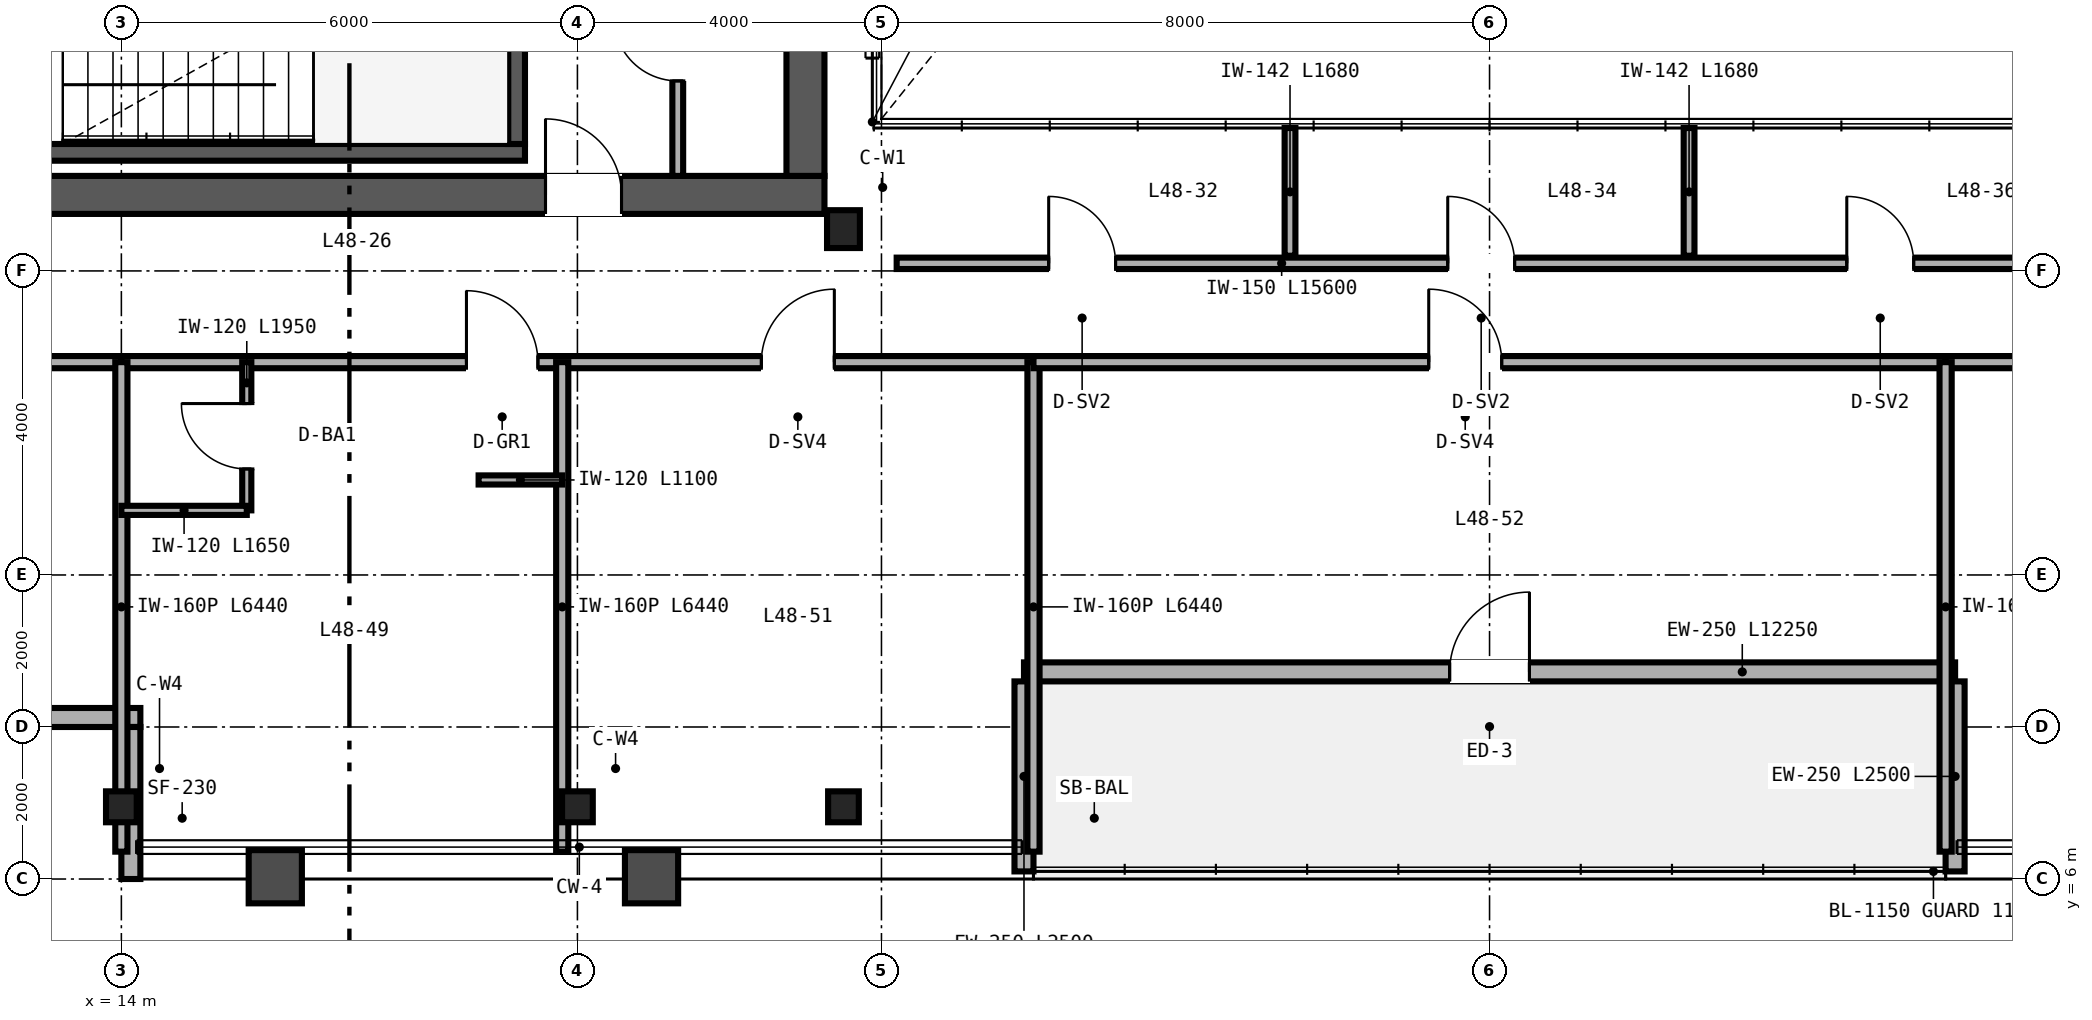
"""IFC4 building model, lengths in metres.
Left out: names, types, materials, properties, quantities, classifications, styles, units other than length and angle.
Written with IfcOpenShell. Run it as: python <this file> out.ifc"""

import sys

from ifc_helpers import new_model, si_unit, direction, frame, frame_2d, origin, origin_2d, place, context, subcontext, project, spatial, rectangle, i_section, extrude, source, transform, mapped, element, fill, save


model = new_model("IFC4")
c1 = context("Model", 3, precision=1e-05, world=origin(), true_north=direction((0.0, 1.0)))
c2 = subcontext(c1, "Body", "Model", "MODEL_VIEW")
j1 = project(units=[si_unit("LENGTHUNIT", "METRE"), si_unit("PLANEANGLEUNIT", "RADIAN")], contexts=[c1])
p1 = place(None, origin())
s1 = spatial("IfcSite", under=j1, at=p1, CompositionType="ELEMENT")
p2 = place(p1, origin())
s2 = spatial("IfcBuilding", under=s1, at=p2, CompositionType="ELEMENT")
p3 = place(p2, frame((0.0, 0.0, 192.0)))
s3 = spatial("IfcBuildingStorey", under=s2, at=p3, CompositionType="ELEMENT", Elevation=192.0)
p4 = place(p3, frame((10.75, 15.0, 0.0), z_axis=(0.0, 0.0, 1.0), x_axis=(1.0, 0.0, 0.0)))
e1 = element("IfcWall", 1, at=p4, inside=s3, PredefinedType="SHEAR", context=c2, shape_type="SweptSolid", body=[
    extrude(rectangle(XDim=12.5, YDim=0.5, at=frame_2d((6.25, 0.0))), origin(), (0.0, 0.0, 1.0), 3.37),
])
p5 = place(p4, frame((8.83, 0.0, 0.0)))
e2 = element("IfcOpeningElement", 2, at=p5, cuts=e1, PredefinedType="OPENING", context=c2, shape_type="SweptSolid", body=[
    extrude(rectangle(XDim=1.0, YDim=2.15, at=frame_2d((0.5, 1.075))), frame((0.0, 0.26, 0.0), z_axis=(0.0, -1.0, 0.0), x_axis=(1.0, 0.0, 0.0)), (0.0, 0.0, 1.0), 0.52),
])
p6 = place(p3, frame((23.0, 15.25, 0.0), z_axis=(0.0, 0.0, 1.0), x_axis=(0.0, 1.0, 0.0)))
e3 = element("IfcWall", 3, at=p6, inside=s3, PredefinedType="SHEAR", context=c2, shape_type="SweptSolid", body=[
    extrude(rectangle(XDim=21.5, YDim=0.5, at=frame_2d((10.75, 0.0))), origin(), (0.0, 0.0, 1.0), 3.37),
])
p7 = place(p3, frame((11.25, 15.56, 0.0), z_axis=(0.0, 0.0, 1.0), x_axis=(1.0, 0.0, 0.0)))
e4 = element("IfcWall", 4, at=p7, inside=s3, PredefinedType="SHEAR", context=c2, shape_type="SweptSolid", body=[
    extrude(rectangle(XDim=8.06, YDim=0.22, at=frame_2d((4.03, 0.0))), origin(), (0.0, 0.0, 1.0), 3.4),
])
p8 = place(p3, frame((19.2, 15.67, 0.0), z_axis=(0.0, 0.0, 1.0), x_axis=(0.0, 1.0, 0.0)))
e5 = element("IfcWall", 5, at=p8, inside=s3, PredefinedType="SHEAR", context=c2, shape_type="SweptSolid", body=[
    extrude(rectangle(XDim=3.28, YDim=0.22, at=frame_2d((1.64, 0.0))), origin(), (0.0, 0.0, 1.0), 3.4),
])
m1 = source(origin(), c2, "Body", "SweptSolid", [
    extrude(i_section(OverallWidth=0.432, OverallDepth=0.498, WebThickness=0.056, FlangeThickness=0.089, FilletRadius=0.025, at=origin_2d()), origin(), (0.0, 0.0, 1.0), 3.37),
])
p9 = place(p3, frame((23.5, 14.55, 0.0), z_axis=(0.0, 0.0, 1.0), x_axis=(1.0, 0.0, 0.0)))
e6 = element("IfcColumn", 6, at=p9, inside=s3, PredefinedType="COLUMN", context=c2, shape_type="MappedRepresentation", body=[
    mapped(m1, transform((0.0, 0.0, 0.0), scale=1.0)),
])
m2 = source(origin(), c2, "Body", "SweptSolid", [
    extrude(i_section(OverallWidth=0.404, OverallDepth=0.407, WebThickness=0.027, FlangeThickness=0.044, FilletRadius=0.025, at=origin_2d()), origin(), (0.0, 0.0, 1.0), 3.37),
])
for number, where, z_axis, x_axis in (
    (7, (14.0, 6.95, 0.0), (0.0, 0.0, 1.0), (1.0, 0.0, 0.0)),
    (8, (20.0, 6.95, 0.0), (0.0, 0.0, 1.0), (1.0, 0.0, 0.0)),
    (9, (23.5, 6.95, 0.0), (0.0, 0.0, 1.0), (1.0, 0.0, 0.0)),
):
    element("IfcColumn", number, at=place(p3, frame(where, z_axis=z_axis, x_axis=x_axis)), inside=s3, PredefinedType="COLUMN", context=c2, shape_type="MappedRepresentation", body=[
        mapped(m2, transform((0.0, 0.0, 0.0), scale=1.0)),
    ])
p10 = place(p3, frame((12.25, 8.125, 0.0), z_axis=(0.0, 0.0, 1.0), x_axis=(1.0, 0.0, 0.0)))
e10 = element("IfcWall", 10, at=p10, inside=s3, PredefinedType="SOLIDWALL", context=c2, shape_type="SweptSolid", body=[
    extrude(rectangle(XDim=2.0, YDim=0.25, at=frame_2d((1.0, 0.0))), origin(), (0.0, 0.0, 1.0), 3.37),
])
p11 = place(p3, frame((14.125, 8.0, 0.0), z_axis=(0.0, 0.0, 1.0), x_axis=(0.0, -1.0, 0.0)))
e11 = element("IfcWall", 11, at=p11, inside=s3, PredefinedType="SOLIDWALL", context=c2, shape_type="SweptSolid", body=[
    extrude(rectangle(XDim=2.0, YDim=0.25, at=frame_2d((1.0, 0.0))), origin(), (0.0, 0.0, 1.0), 2.677),
])
p12 = place(p3, frame((25.875, 8.725, 0.0), z_axis=(0.0, 0.0, 1.0), x_axis=(1.0, 0.0, 0.0)))
e12 = element("IfcWall", 12, at=p12, inside=s3, PredefinedType="SOLIDWALL", context=c2, shape_type="SweptSolid", body=[
    extrude(rectangle(XDim=12.25, YDim=0.25, at=frame_2d((6.125, 0.0))), origin(), (0.0, 0.0, 1.0), 3.37),
])
p13 = place(p12, frame((5.6, 0.0, 0.0)))
e13 = element("IfcOpeningElement", 13, at=p13, cuts=e12, PredefinedType="OPENING", context=c2, shape_type="SweptSolid", body=[
    extrude(rectangle(XDim=1.05, YDim=2.15, at=frame_2d((0.525, 1.075))), frame((0.0, 0.135, 0.0), z_axis=(0.0, -1.0, 0.0), x_axis=(1.0, 0.0, 0.0)), (0.0, 0.0, 1.0), 0.27),
])
for number, where, z_axis, x_axis in (
    (14, (25.875, 6.1, 0.0), (0.0, 0.0, 1.0), (0.0, 1.0, 0.0)),
    (15, (38.125, 6.1, 0.0), (0.0, 0.0, 1.0), (0.0, 1.0, 0.0)),
):
    element("IfcWall", number, at=place(p3, frame(where, z_axis=z_axis, x_axis=x_axis)), inside=s3, PredefinedType="SOLIDWALL", context=c2, shape_type="SweptSolid", body=[
        extrude(rectangle(XDim=2.5, YDim=0.25, at=frame_2d((1.25, 0.0))), origin(), (0.0, 0.0, 1.0), 2.443),
    ])
p14 = place(p3, frame((21.32, 15.25, 0.0), z_axis=(0.0, 0.0, 1.0), x_axis=(0.0, 1.0, 0.0)))
e16 = element("IfcWall", 16, at=p14, inside=s3, PredefinedType="PARTITIONING", context=c2, shape_type="SweptSolid", body=[
    extrude(rectangle(XDim=3.59, YDim=0.142, at=frame_2d((1.795, 0.0))), origin(), (0.0, 0.0, 1.0), 3.37),
])
p15 = place(p14, frame((1.25, 0.0, 0.0)))
e17 = element("IfcOpeningElement", 17, at=p15, cuts=e16, PredefinedType="OPENING", context=c2, shape_type="SweptSolid", body=[
    extrude(rectangle(XDim=0.84, YDim=2.1, at=frame_2d((0.42, 1.05))), frame((0.0, 0.081, 0.0), z_axis=(0.0, -1.0, 0.0), x_axis=(1.0, 0.0, 0.0)), (0.0, 0.0, 1.0), 0.162),
])
p16 = place(p3, frame((24.2, 14.1, 0.0), z_axis=(0.0, 0.0, 1.0), x_axis=(1.0, 0.0, 0.0)))
e18 = element("IfcWall", 18, at=p16, inside=s3, PredefinedType="PARTITIONING", context=c2, shape_type="SweptSolid", body=[
    extrude(rectangle(XDim=15.6, YDim=0.15, at=frame_2d((7.8, 0.0))), origin(), (0.0, 0.0, 1.0), 3.37),
])
p17 = place(p16, frame((2.0, 0.0, 0.0)))
e19 = element("IfcOpeningElement", 19, at=p17, cuts=e18, PredefinedType="OPENING", context=c2, shape_type="SweptSolid", body=[
    extrude(rectangle(XDim=0.88, YDim=2.15, at=frame_2d((0.44, 1.075))), frame((0.0, 0.085, 0.0), z_axis=(0.0, -1.0, 0.0), x_axis=(1.0, 0.0, 0.0)), (0.0, 0.0, 1.0), 0.17),
])
p18 = place(p16, frame((7.25, 0.0, 0.0)))
e20 = element("IfcOpeningElement", 20, at=p18, cuts=e18, PredefinedType="OPENING", context=c2, shape_type="SweptSolid", body=[
    extrude(rectangle(XDim=0.88, YDim=2.15, at=frame_2d((0.44, 1.075))), frame((0.0, 0.085, 0.0), z_axis=(0.0, -1.0, 0.0), x_axis=(1.0, 0.0, 0.0)), (0.0, 0.0, 1.0), 0.17),
])
p19 = place(p16, frame((12.5, 0.0, 0.0)))
e21 = element("IfcOpeningElement", 21, at=p19, cuts=e18, PredefinedType="OPENING", context=c2, shape_type="SweptSolid", body=[
    extrude(rectangle(XDim=0.88, YDim=2.15, at=frame_2d((0.44, 1.075))), frame((0.0, 0.085, 0.0), z_axis=(0.0, -1.0, 0.0), x_axis=(1.0, 0.0, 0.0)), (0.0, 0.0, 1.0), 0.17),
])
for number, where, z_axis, x_axis in (
    (22, (29.375, 14.2, 0.0), (0.0, 0.0, 1.0), (0.0, 1.0, 0.0)),
    (23, (34.625, 14.2, 0.0), (0.0, 0.0, 1.0), (0.0, 1.0, 0.0)),
):
    element("IfcWall", number, at=place(p3, frame(where, z_axis=z_axis, x_axis=x_axis)), inside=s3, PredefinedType="PARTITIONING", context=c2, shape_type="SweptSolid", body=[
        extrude(rectangle(XDim=1.68, YDim=0.142, at=frame_2d((0.84, 0.0))), origin(), (0.0, 0.0, 1.0), 3.37),
    ])
p20 = place(p3, frame((10.0, 12.8, 0.0), z_axis=(0.0, 0.0, 1.0), x_axis=(1.0, 0.0, 0.0)))
e24 = element("IfcWall", 24, at=p20, inside=s3, PredefinedType="PARTITIONING", context=c2, shape_type="SweptSolid", body=[
    extrude(rectangle(XDim=4.0, YDim=0.16, at=frame_2d((2.0, 0.0))), origin(), (0.0, 0.0, 1.0), 3.37),
])
p21 = place(p20, frame((1.52, 0.0, 0.0)))
e25 = element("IfcOpeningElement", 25, at=p21, cuts=e24, PredefinedType="OPENING", context=c2, shape_type="SweptSolid", body=[
    extrude(rectangle(XDim=0.96, YDim=2.15, at=frame_2d((0.48, 1.075))), frame((0.0, 0.09, 0.0), z_axis=(0.0, -1.0, 0.0), x_axis=(1.0, 0.0, 0.0)), (0.0, 0.0, 1.0), 0.18),
])
p22 = place(p3, frame((14.0, 12.8, 0.0), z_axis=(0.0, 0.0, 1.0), x_axis=(1.0, 0.0, 0.0)))
e26 = element("IfcWall", 26, at=p22, inside=s3, PredefinedType="PARTITIONING", context=c2, shape_type="SweptSolid", body=[
    extrude(rectangle(XDim=12.0, YDim=0.16, at=frame_2d((6.0, 0.0))), origin(), (0.0, 0.0, 1.0), 2.913),
])
p23 = place(p22, frame((4.54, 0.0, 0.0)))
e27 = element("IfcOpeningElement", 27, at=p23, cuts=e26, PredefinedType="OPENING", context=c2, shape_type="SweptSolid", body=[
    extrude(rectangle(XDim=0.94, YDim=2.15, at=frame_2d((0.47, 1.075))), frame((0.0, 0.09, 0.0), z_axis=(0.0, -1.0, 0.0), x_axis=(1.0, 0.0, 0.0)), (0.0, 0.0, 1.0), 0.18),
])
p24 = place(p22, frame((8.42, 0.0, 0.0)))
e28 = element("IfcOpeningElement", 28, at=p24, cuts=e26, PredefinedType="OPENING", context=c2, shape_type="SweptSolid", body=[
    extrude(rectangle(XDim=0.96, YDim=2.15, at=frame_2d((0.48, 1.075))), frame((0.0, 0.09, 0.0), z_axis=(0.0, -1.0, 0.0), x_axis=(1.0, 0.0, 0.0)), (0.0, 0.0, 1.0), 0.18),
])
p25 = place(p3, frame((14.0, 6.36, 0.0), z_axis=(0.0, 0.0, 1.0), x_axis=(0.0, 1.0, 0.0)))
e29 = element("IfcWall", 29, at=p25, inside=s3, PredefinedType="PARTITIONING", context=c2, shape_type="SweptSolid", body=[
    extrude(rectangle(XDim=6.44, YDim=0.16, at=frame_2d((3.22, 0.0))), origin(), (0.0, 0.0, 1.0), 2.677),
])
p26 = place(p3, frame((26.0, 6.36, 0.0), z_axis=(0.0, 0.0, 1.0), x_axis=(0.0, 1.0, 0.0)))
e30 = element("IfcWall", 30, at=p26, inside=s3, PredefinedType="PARTITIONING", context=c2, shape_type="SweptSolid", body=[
    extrude(rectangle(XDim=6.44, YDim=0.16, at=frame_2d((3.22, 0.0))), origin(), (0.0, 0.0, 1.0), 2.443),
])
p27 = place(p3, frame((19.8, 6.36, 0.0), z_axis=(0.0, 0.0, 1.0), x_axis=(0.0, 1.0, 0.0)))
e31 = element("IfcWall", 31, at=p27, inside=s3, PredefinedType="PARTITIONING", context=c2, shape_type="SweptSolid", body=[
    extrude(rectangle(XDim=6.44, YDim=0.16, at=frame_2d((3.22, 0.0))), origin(), (0.0, 0.0, 1.0), 2.677),
])
p28 = place(p3, frame((15.65, 10.85, 0.0), z_axis=(0.0, 0.0, 1.0), x_axis=(0.0, 1.0, 0.0)))
e32 = element("IfcWall", 32, at=p28, inside=s3, PredefinedType="PARTITIONING", context=c2, shape_type="SweptSolid", body=[
    extrude(rectangle(XDim=1.95, YDim=0.12, at=frame_2d((0.975, 0.0))), origin(), (0.0, 0.0, 1.0), 3.37),
])
p29 = place(p28, frame((0.545, 0.0, 0.0)))
e33 = element("IfcOpeningElement", 33, at=p29, cuts=e32, PredefinedType="OPENING", context=c2, shape_type="SweptSolid", body=[
    extrude(rectangle(XDim=0.86, YDim=2.1, at=frame_2d((0.43, 1.05))), frame((0.0, 0.07, 0.0), z_axis=(0.0, -1.0, 0.0), x_axis=(1.0, 0.0, 0.0)), (0.0, 0.0, 1.0), 0.14),
])
p30 = place(p3, frame((14.0, 10.85, 0.0), z_axis=(0.0, 0.0, 1.0), x_axis=(1.0, 0.0, 0.0)))
e34 = element("IfcWall", 34, at=p30, inside=s3, PredefinedType="PARTITIONING", context=c2, shape_type="SweptSolid", body=[
    extrude(rectangle(XDim=1.65, YDim=0.12, at=frame_2d((0.825, 0.0))), origin(), (0.0, 0.0, 1.0), 3.37),
])
p31 = place(p3, frame((18.7, 11.25, 0.0), z_axis=(0.0, 0.0, 1.0), x_axis=(1.0, 0.0, 0.0)))
e35 = element("IfcWall", 35, at=p31, inside=s3, PredefinedType="PARTITIONING", context=c2, shape_type="SweptSolid", body=[
    extrude(rectangle(XDim=1.1, YDim=0.12, at=frame_2d((0.55, 0.0))), origin(), (0.0, 0.0, 1.0), 3.37),
])
p32 = place(p3, frame((26.0, 12.8, 0.0), z_axis=(0.0, 0.0, 1.0), x_axis=(1.0, 0.0, 0.0)))
e36 = element("IfcWall", 36, at=p32, inside=s3, PredefinedType="PARTITIONING", context=c2, shape_type="SweptSolid", body=[
    extrude(rectangle(XDim=12.0, YDim=0.16, at=frame_2d((6.0, 0.0))), origin(), (0.0, 0.0, 1.0), 3.37),
])
p33 = place(p32, frame((5.2, 0.0, 0.0)))
e37 = element("IfcOpeningElement", 37, at=p33, cuts=e36, PredefinedType="OPENING", context=c2, shape_type="SweptSolid", body=[
    extrude(rectangle(XDim=0.96, YDim=2.15, at=frame_2d((0.48, 1.075))), frame((0.0, 0.09, 0.0), z_axis=(0.0, -1.0, 0.0), x_axis=(1.0, 0.0, 0.0)), (0.0, 0.0, 1.0), 0.18),
])
p34 = place(p3, frame((38.0, 12.8, 0.0), z_axis=(0.0, 0.0, 1.0), x_axis=(1.0, 0.0, 0.0)))
e38 = element("IfcWall", 38, at=p34, inside=s3, PredefinedType="PARTITIONING", context=c2, shape_type="SweptSolid", body=[
    extrude(rectangle(XDim=12.0, YDim=0.16, at=frame_2d((6.0, 0.0))), origin(), (0.0, 0.0, 1.0), 2.913),
])
p35 = place(p34, frame((2.42, 0.0, 0.0)))
e39 = element("IfcOpeningElement", 39, at=p35, cuts=e38, PredefinedType="OPENING", context=c2, shape_type="SweptSolid", body=[
    extrude(rectangle(XDim=0.96, YDim=2.15, at=frame_2d((0.48, 1.075))), frame((0.0, 0.09, 0.0), z_axis=(0.0, -1.0, 0.0), x_axis=(1.0, 0.0, 0.0)), (0.0, 0.0, 1.0), 0.18),
])
p36 = place(p34, frame((10.74, 0.0, 0.0)))
e40 = element("IfcOpeningElement", 40, at=p36, cuts=e38, PredefinedType="OPENING", context=c2, shape_type="SweptSolid", body=[
    extrude(rectangle(XDim=0.94, YDim=2.15, at=frame_2d((0.47, 1.075))), frame((0.0, 0.09, 0.0), z_axis=(0.0, -1.0, 0.0), x_axis=(1.0, 0.0, 0.0)), (0.0, 0.0, 1.0), 0.18),
])
p37 = place(p3, frame((38.0, 6.36, 0.0), z_axis=(0.0, 0.0, 1.0), x_axis=(0.0, 1.0, 0.0)))
e41 = element("IfcWall", 41, at=p37, inside=s3, PredefinedType="PARTITIONING", context=c2, shape_type="SweptSolid", body=[
    extrude(rectangle(XDim=6.44, YDim=0.16, at=frame_2d((3.22, 0.0))), origin(), (0.0, 0.0, 1.0), 2.443),
])
m3 = source(origin(), c2, "Body", "SweptSolid", [
    extrude(rectangle(XDim=1.05, YDim=2.15, at=frame_2d((0.525, 1.075))), frame((0.0, 0.025, 0.0), z_axis=(0.0, -1.0, 0.0), x_axis=(1.0, 0.0, 0.0)), (0.0, 0.0, 1.0), 0.05),
])
p38 = place(p13, origin())
e42 = element("IfcDoor", 42, at=p38, inside=s3, OperationType="SINGLE_SWING_RIGHT", PredefinedType="DOOR", context=c2, shape_type="MappedRepresentation", body=[
    mapped(m3, transform((0.0, 0.0, 0.0), scale=1.0)),
])
fill(e13, e42)
m4 = source(origin(), c2, "Body", "SweptSolid", [
    extrude(rectangle(XDim=0.84, YDim=2.1, at=frame_2d((0.42, 1.05))), frame((0.0, 0.025, 0.0), z_axis=(0.0, -1.0, 0.0), x_axis=(1.0, 0.0, 0.0)), (0.0, 0.0, 1.0), 0.05),
])
p39 = place(p15, origin())
e43 = element("IfcDoor", 43, at=p39, inside=s3, OperationType="SINGLE_SWING_RIGHT", PredefinedType="DOOR", context=c2, shape_type="MappedRepresentation", body=[
    mapped(m4, transform((0.0, 0.0, 0.0), scale=1.0)),
])
fill(e17, e43)
m5 = source(origin(), c2, "Body", "SweptSolid", [
    extrude(rectangle(XDim=1.0, YDim=2.15, at=frame_2d((0.5, 1.075))), frame((0.0, 0.025, 0.0), z_axis=(0.0, -1.0, 0.0), x_axis=(1.0, 0.0, 0.0)), (0.0, 0.0, 1.0), 0.05),
])
p40 = place(p5, origin())
e44 = element("IfcDoor", 44, at=p40, inside=s3, OperationType="SINGLE_SWING_LEFT", PredefinedType="DOOR", context=c2, shape_type="MappedRepresentation", body=[
    mapped(m5, transform((0.0, 0.0, 0.0), scale=1.0)),
])
fill(e2, e44)
m6 = source(origin(), c2, "Body", "SweptSolid", [
    extrude(rectangle(XDim=0.88, YDim=2.15, at=frame_2d((0.44, 1.075))), frame((0.0, 0.025, 0.0), z_axis=(0.0, -1.0, 0.0), x_axis=(1.0, 0.0, 0.0)), (0.0, 0.0, 1.0), 0.05),
])
p41 = place(p17, origin())
e45 = element("IfcDoor", 45, at=p41, inside=s3, OperationType="SINGLE_SWING_LEFT", PredefinedType="DOOR", context=c2, shape_type="MappedRepresentation", body=[
    mapped(m6, transform((0.0, 0.0, 0.0), scale=1.0)),
])
fill(e19, e45)
p42 = place(p18, origin())
e46 = element("IfcDoor", 46, at=p42, inside=s3, OperationType="SINGLE_SWING_LEFT", PredefinedType="DOOR", context=c2, shape_type="MappedRepresentation", body=[
    mapped(m6, transform((0.0, 0.0, 0.0), scale=1.0)),
])
fill(e20, e46)
p43 = place(p19, origin())
e47 = element("IfcDoor", 47, at=p43, inside=s3, OperationType="SINGLE_SWING_LEFT", PredefinedType="DOOR", context=c2, shape_type="MappedRepresentation", body=[
    mapped(m6, transform((0.0, 0.0, 0.0), scale=1.0)),
])
fill(e21, e47)
m7 = source(origin(), c2, "Body", "SweptSolid", [
    extrude(rectangle(XDim=0.86, YDim=2.1, at=frame_2d((0.43, 1.05))), frame((0.0, 0.025, 0.0), z_axis=(0.0, -1.0, 0.0), x_axis=(1.0, 0.0, 0.0)), (0.0, 0.0, 1.0), 0.05),
])
p44 = place(p29, origin())
e48 = element("IfcDoor", 48, at=p44, inside=s3, OperationType="SINGLE_SWING_RIGHT", PredefinedType="DOOR", context=c2, shape_type="MappedRepresentation", body=[
    mapped(m7, transform((0.0, 0.0, 0.0), scale=1.0)),
])
fill(e33, e48)
m8 = source(origin(), c2, "Body", "SweptSolid", [
    extrude(rectangle(XDim=0.94, YDim=2.15, at=frame_2d((0.47, 1.075))), frame((0.0, 0.025, 0.0), z_axis=(0.0, -1.0, 0.0), x_axis=(1.0, 0.0, 0.0)), (0.0, 0.0, 1.0), 0.05),
])
p45 = place(p23, origin())
e49 = element("IfcDoor", 49, at=p45, inside=s3, OperationType="SINGLE_SWING_LEFT", PredefinedType="DOOR", context=c2, shape_type="MappedRepresentation", body=[
    mapped(m8, transform((0.0, 0.0, 0.0), scale=1.0)),
])
fill(e27, e49)
m9 = source(origin(), c2, "Body", "SweptSolid", [
    extrude(rectangle(XDim=0.96, YDim=2.15, at=frame_2d((0.48, 1.075))), frame((0.0, 0.025, 0.0), z_axis=(0.0, -1.0, 0.0), x_axis=(1.0, 0.0, 0.0)), (0.0, 0.0, 1.0), 0.05),
])
p46 = place(p24, origin())
e50 = element("IfcDoor", 50, at=p46, inside=s3, OperationType="SINGLE_SWING_RIGHT", PredefinedType="DOOR", context=c2, shape_type="MappedRepresentation", body=[
    mapped(m9, transform((0.0, 0.0, 0.0), scale=1.0)),
])
fill(e28, e50)
p47 = place(p33, origin())
e51 = element("IfcDoor", 51, at=p47, inside=s3, OperationType="SINGLE_SWING_LEFT", PredefinedType="DOOR", context=c2, shape_type="MappedRepresentation", body=[
    mapped(m9, transform((0.0, 0.0, 0.0), scale=1.0)),
])
fill(e37, e51)
save(model, sys.argv[1])
